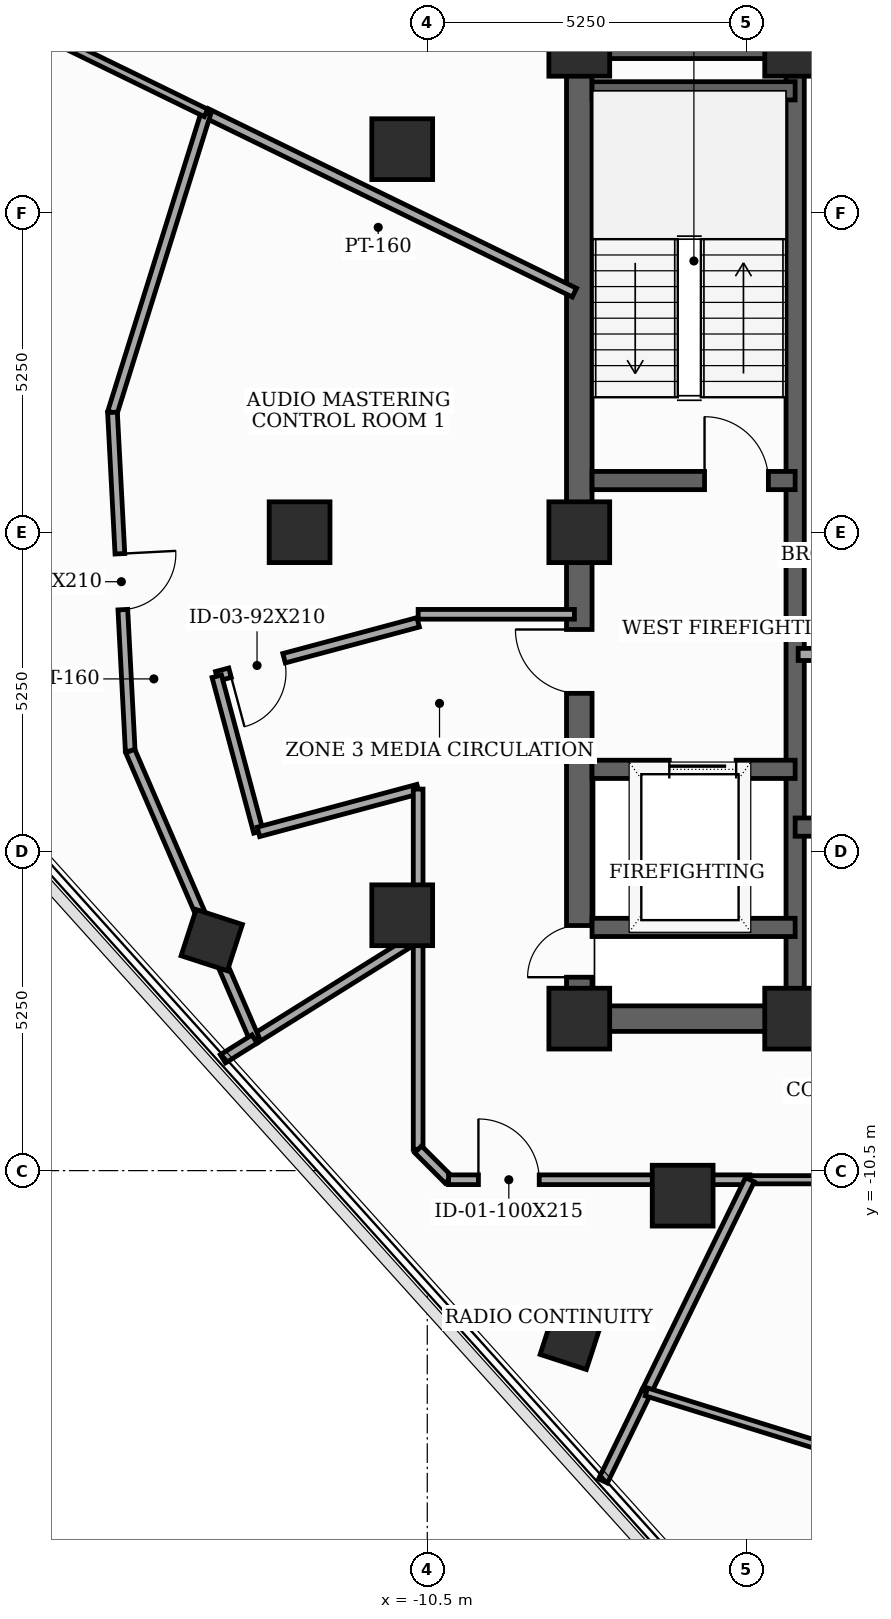
"""IFC4 building model, lengths in metres.
Left out: names, types, materials, properties, quantities, classifications, styles, units other than length and angle.
Written with IfcOpenShell. Run it as: python <this file> out.ifc"""

import sys

from ifc_helpers import new_model, si_unit, direction, frame, frame_2d, origin, origin_2d, place, context, subcontext, project, spatial, rectangle, extrude, element, fill, save


model = new_model("IFC4")
c1 = context("Model", 3, precision=1e-05, world=origin(), true_north=direction((0.0, 1.0)))
c2 = subcontext(c1, "Body", "Model", "MODEL_VIEW")
j1 = project(units=[si_unit("LENGTHUNIT", "METRE"), si_unit("PLANEANGLEUNIT", "RADIAN")], contexts=[c1])
p1 = place(None, origin())
s1 = spatial("IfcSite", under=j1, at=p1, CompositionType="ELEMENT")
p2 = place(p1, origin())
s2 = spatial("IfcBuilding", under=s1, at=p2, CompositionType="ELEMENT")
p3 = place(p2, frame((0.0, 0.0, 305.4)))
s3 = spatial("IfcBuildingStorey", under=s2, at=p3, CompositionType="ELEMENT", Elevation=305.4)
for number, where, z_axis, x_axis in (
    (1, (-8.0, -8.0, 0.0), (0.0, 0.0, 1.0), (1.0, 0.0, 0.0)),
    (2, (-4.45, -8.0, 0.0), (0.0, 0.0, 1.0), (1.0, 0.0, 0.0)),
    (3, (-4.45, 8.0, 0.0), (0.0, 0.0, 1.0), (1.0, 0.0, 0.0)),
    (4, (-8.0, 8.0, 0.0), (0.0, 0.0, 1.0), (1.0, 0.0, 0.0)),
    (5, (-8.0, 0.0, 0.0), (0.0, 0.0, 1.0), (1.0, 0.0, 0.0)),
    (6, (-10.912, 6.3, 0.0), (0.0, 0.0, 1.0), (1.0, 0.0, 0.0)),
    (7, (-12.6, 0.0, 0.0), (0.0, 0.0, 1.0), (1.0, 0.0, 0.0)),
    (8, (-10.912, -6.3, 0.0), (0.0, 0.0, 1.0), (1.0, 0.0, 0.0)),
    (9, (-6.3, -10.912, 0.0), (0.0, 0.0, 1.0), (1.0, 0.0, 0.0)),
):
    element("IfcColumn", number, at=place(p3, frame(where, z_axis=z_axis, x_axis=x_axis)), inside=s3, PredefinedType="COLUMN", context=c2, shape_type="SweptSolid", body=[
        extrude(rectangle(XDim=1.0, YDim=1.0, at=origin_2d()), origin(), (0.0, 0.0, 1.0), 3.7),
    ])
for number, where, z_axis, x_axis in (
    (10, (-14.045, -6.709, 0.0), (0.0, 0.0, 1.0), (0.309, 0.951, 0.0)),
    (11, (-8.14, -13.266, 0.0), (0.0, 0.0, 1.0), (0.309, 0.951, 0.0)),
):
    element("IfcColumn", number, at=place(p3, frame(where, z_axis=z_axis, x_axis=x_axis)), inside=s3, PredefinedType="COLUMN", context=c2, shape_type="SweptSolid", body=[
        extrude(rectangle(XDim=0.8, YDim=0.8, at=origin_2d()), origin(), (0.0, 0.0, 1.0), 3.7),
    ])
p4 = place(p3, frame((-8.0, -8.0, 0.0), z_axis=(0.0, 0.0, 1.0), x_axis=(0.0, 1.0, 0.0)))
e12 = element("IfcWall", 12, at=p4, inside=s3, PredefinedType="SHEAR", context=c2, shape_type="SweptSolid", body=[
    extrude(rectangle(XDim=16.0, YDim=0.42, at=frame_2d((8.0, 0.0))), origin(), (0.0, 0.0, 1.0), 3.5),
])
p5 = place(p4, frame((0.681, 0.0, 0.0)))
e13 = element("IfcOpeningElement", 13, at=p5, cuts=e12, PredefinedType="OPENING", context=c2, shape_type="SweptSolid", body=[
    extrude(rectangle(XDim=0.85, YDim=2.02, at=frame_2d((0.425, 1.01))), frame((0.0, 0.22, 0.0), z_axis=(0.0, -1.0, 0.0), x_axis=(1.0, 0.0, 0.0)), (0.0, 0.0, 1.0), 0.44),
])
p6 = place(p4, frame((5.35, 0.0, 0.0)))
e14 = element("IfcOpeningElement", 14, at=p6, cuts=e12, PredefinedType="OPENING", context=c2, shape_type="SweptSolid", body=[
    extrude(rectangle(XDim=1.05, YDim=2.15, at=frame_2d((0.525, 1.075))), frame((0.0, 0.22, 0.0), z_axis=(0.0, -1.0, 0.0), x_axis=(1.0, 0.0, 0.0)), (0.0, 0.0, 1.0), 0.44),
])
p7 = place(p3, frame((-8.0, -8.0, 0.0), z_axis=(0.0, 0.0, 1.0), x_axis=(1.0, 0.0, 0.0)))
e15 = element("IfcWall", 15, at=p7, inside=s3, PredefinedType="SHEAR", context=c2, shape_type="SweptSolid", body=[
    extrude(rectangle(XDim=16.0, YDim=0.42, at=frame_2d((8.0, 0.0))), origin(), (0.0, 0.0, 1.0), 3.5),
])
p8 = place(p7, frame((4.35, 0.0, 0.0)))
e16 = element("IfcOpeningElement", 16, at=p8, cuts=e15, PredefinedType="OPENING", context=c2, shape_type="SweptSolid", body=[
    extrude(rectangle(XDim=0.85, YDim=2.02, at=frame_2d((0.425, 1.01))), frame((0.0, 0.22, 0.0), z_axis=(0.0, -1.0, 0.0), x_axis=(1.0, 0.0, 0.0)), (0.0, 0.0, 1.0), 0.44),
])
p9 = place(p7, frame((6.49, 0.0, 0.0)))
e17 = element("IfcOpeningElement", 17, at=p9, cuts=e15, PredefinedType="OPENING", context=c2, shape_type="SweptSolid", body=[
    extrude(rectangle(XDim=0.85, YDim=2.02, at=frame_2d((0.425, 1.01))), frame((0.0, 0.22, 0.0), z_axis=(0.0, -1.0, 0.0), x_axis=(1.0, 0.0, 0.0)), (0.0, 0.0, 1.0), 0.44),
])
p10 = place(p7, frame((8.69, 0.0, 0.0)))
e18 = element("IfcOpeningElement", 18, at=p10, cuts=e15, PredefinedType="OPENING", context=c2, shape_type="SweptSolid", body=[
    extrude(rectangle(XDim=0.85, YDim=2.02, at=frame_2d((0.425, 1.01))), frame((0.0, 0.22, 0.0), z_axis=(0.0, -1.0, 0.0), x_axis=(1.0, 0.0, 0.0)), (0.0, 0.0, 1.0), 0.44),
])
p11 = place(p7, frame((10.8, 0.0, 0.0)))
e19 = element("IfcOpeningElement", 19, at=p11, cuts=e15, PredefinedType="OPENING", context=c2, shape_type="SweptSolid", body=[
    extrude(rectangle(XDim=0.85, YDim=2.02, at=frame_2d((0.425, 1.01))), frame((0.0, 0.22, 0.0), z_axis=(0.0, -1.0, 0.0), x_axis=(1.0, 0.0, 0.0)), (0.0, 0.0, 1.0), 0.44),
])
p12 = place(p3, frame((-8.0, 8.0, 0.0), z_axis=(0.0, 0.0, 1.0), x_axis=(1.0, 0.0, 0.0)))
e20 = element("IfcWall", 20, at=p12, inside=s3, PredefinedType="SHEAR", context=c2, shape_type="SweptSolid", body=[
    extrude(rectangle(XDim=16.0, YDim=0.42, at=frame_2d((8.0, 0.0))), origin(), (0.0, 0.0, 1.0), 3.5),
])
p13 = place(p12, frame((7.1, 0.0, 0.0)))
e21 = element("IfcOpeningElement", 21, at=p13, cuts=e20, PredefinedType="OPENING", context=c2, shape_type="SweptSolid", body=[
    extrude(rectangle(XDim=1.8, YDim=2.15, at=frame_2d((0.9, 1.075))), frame((0.0, 0.22, 0.0), z_axis=(0.0, -1.0, 0.0), x_axis=(1.0, 0.0, 0.0)), (0.0, 0.0, 1.0), 0.44),
])
p14 = place(p3, frame((-4.45, -7.79, 0.0), z_axis=(0.0, 0.0, 1.0), x_axis=(0.0, 1.0, 0.0)))
e22 = element("IfcWall", 22, at=p14, inside=s3, PredefinedType="SHEAR", context=c2, shape_type="SweptSolid", body=[
    extrude(rectangle(XDim=15.58, YDim=0.3, at=frame_2d((7.79, 0.0))), origin(), (0.0, 0.0, 1.0), 3.5),
])
p15 = place(p3, frame((-7.79, 0.85, 0.0), z_axis=(0.0, 0.0, 1.0), x_axis=(1.0, 0.0, 0.0)))
e23 = element("IfcWall", 23, at=p15, inside=s3, PredefinedType="SHEAR", context=c2, shape_type="SweptSolid", body=[
    extrude(rectangle(XDim=3.34, YDim=0.3, at=frame_2d((1.67, 0.0))), origin(), (0.0, 0.0, 1.0), 3.5),
])
p16 = place(p15, frame((1.85, 0.0, 0.0)))
e24 = element("IfcOpeningElement", 24, at=p16, cuts=e23, PredefinedType="OPENING", context=c2, shape_type="SweptSolid", body=[
    extrude(rectangle(XDim=1.05, YDim=2.15, at=frame_2d((0.525, 1.075))), frame((0.0, 0.16, 0.0), z_axis=(0.0, -1.0, 0.0), x_axis=(1.0, 0.0, 0.0)), (0.0, 0.0, 1.0), 0.32),
])
p17 = place(p3, frame((-7.79, 7.26, 0.0), z_axis=(0.0, 0.0, 1.0), x_axis=(1.0, 0.0, 0.0)))
e25 = element("IfcWall", 25, at=p17, inside=s3, PredefinedType="SHEAR", context=c2, shape_type="SweptSolid", body=[
    extrude(rectangle(XDim=3.34, YDim=0.3, at=frame_2d((1.67, 0.0))), origin(), (0.0, 0.0, 1.0), 3.5),
])
p18 = place(p3, frame((-7.79, -3.9, 0.0), z_axis=(0.0, 0.0, 1.0), x_axis=(1.0, 0.0, 0.0)))
e26 = element("IfcWall", 26, at=p18, inside=s3, PredefinedType="SHEAR", context=c2, shape_type="SweptSolid", body=[
    extrude(rectangle(XDim=3.34, YDim=0.3, at=frame_2d((1.67, 0.0))), origin(), (0.0, 0.0, 1.0), 3.5),
])
p19 = place(p18, frame((1.27, 0.0, 0.0)))
e27 = element("IfcOpeningElement", 27, at=p19, cuts=e26, PredefinedType="OPENING", context=c2, shape_type="SweptSolid", body=[
    extrude(rectangle(XDim=1.1, YDim=2.1, at=frame_2d((0.55, 1.05))), frame((0.0, 0.16, 0.0), z_axis=(0.0, -1.0, 0.0), x_axis=(1.0, 0.0, 0.0)), (0.0, 0.0, 1.0), 0.32),
])
p20 = place(p3, frame((-7.79, -6.5, 0.0), z_axis=(0.0, 0.0, 1.0), x_axis=(1.0, 0.0, 0.0)))
e28 = element("IfcWall", 28, at=p20, inside=s3, PredefinedType="SHEAR", context=c2, shape_type="SweptSolid", body=[
    extrude(rectangle(XDim=3.34, YDim=0.3, at=frame_2d((1.67, 0.0))), origin(), (0.0, 0.0, 1.0), 3.5),
])
p21 = place(p3, frame((-4.45, -4.85, 0.0), z_axis=(0.0, 0.0, 1.0), x_axis=(1.0, 0.0, 0.0)))
e29 = element("IfcWall", 29, at=p21, inside=s3, PredefinedType="SHEAR", context=c2, shape_type="SweptSolid", body=[
    extrude(rectangle(XDim=8.9, YDim=0.3, at=frame_2d((4.45, 0.0))), origin(), (0.0, 0.0, 1.0), 3.5),
])
p22 = place(p3, frame((-4.4, -2.01, 0.0), z_axis=(0.0, 0.0, 1.0), x_axis=(1.0, 0.0, 0.0)))
e30 = element("IfcWall", 30, at=p22, inside=s3, PredefinedType="SOLIDWALL", context=c2, shape_type="SweptSolid", body=[
    extrude(rectangle(XDim=2.68, YDim=0.2, at=frame_2d((1.34, 0.0))), origin(), (0.0, 0.0, 1.0), 3.5),
])
p23 = place(p3, frame((-8.08, -1.35, 0.0), z_axis=(0.0, 0.0, 1.0), x_axis=(-1.0, 0.0, 0.0)))
e31 = element("IfcWall", 31, at=p23, inside=s3, PredefinedType="PARTITIONING", context=c2, shape_type="SweptSolid", body=[
    extrude(rectangle(XDim=2.57, YDim=0.16, at=frame_2d((1.285, 0.0))), origin(), (0.0, 0.0, 1.0), 2.885),
])
p24 = place(p3, frame((-10.65, -1.482, 0.0), z_axis=(0.0, 0.0, 1.0), x_axis=(-0.965961397105, -0.2586862565, 0.0)))
e32 = element("IfcWall", 32, at=p24, inside=s3, PredefinedType="PARTITIONING", context=c2, shape_type="SweptSolid", body=[
    extrude(rectangle(XDim=3.429, YDim=0.16, at=frame_2d((1.714, 0.0))), origin(), (0.0, 0.0, 1.0), 2.885),
])
p25 = place(p24, frame((2.283, 0.0, 0.0)))
e33 = element("IfcOpeningElement", 33, at=p25, cuts=e32, PredefinedType="OPENING", context=c2, shape_type="SweptSolid", body=[
    extrude(rectangle(XDim=0.92, YDim=2.1, at=frame_2d((0.46, 1.05))), frame((0.0, 0.09, 0.0), z_axis=(0.0, -1.0, 0.0), x_axis=(1.0, 0.0, 0.0)), (0.0, 0.0, 1.0), 0.18),
])
p26 = place(p3, frame((-13.962, -2.369, 0.0), z_axis=(0.0, 0.0, 1.0), x_axis=(0.258413725385, -0.966034340245, 0.0)))
e34 = element("IfcWall", 34, at=p26, inside=s3, PredefinedType="PARTITIONING", context=c2, shape_type="SweptSolid", body=[
    extrude(rectangle(XDim=2.65, YDim=0.16, at=frame_2d((1.325, 0.0))), origin(), (0.0, 0.0, 1.0), 3.5),
])
p27 = place(p3, frame((-13.277, -4.929, 0.0), z_axis=(0.0, 0.0, 1.0), x_axis=(0.965934830229, 0.258785439601, 0.0)))
e35 = element("IfcWall", 35, at=p27, inside=s3, PredefinedType="PARTITIONING", context=c2, shape_type="SweptSolid", body=[
    extrude(rectangle(XDim=2.72, YDim=0.16, at=frame_2d((1.36, 0.0))), origin(), (0.0, 0.0, 1.0), 2.885),
])
p28 = place(p3, frame((-10.65, -4.225, 0.0), z_axis=(0.0, 0.0, 1.0), x_axis=(0.0, -1.0, 0.0)))
e36 = element("IfcWall", 36, at=p28, inside=s3, PredefinedType="PARTITIONING", context=c2, shape_type="SweptSolid", body=[
    extrude(rectangle(XDim=2.43, YDim=0.16, at=frame_2d((1.215, 0.0))), origin(), (0.0, 0.0, 1.0), 2.885),
])
p29 = place(p3, frame((-10.65, -6.655, 0.0), z_axis=(0.0, 0.0, 1.0), x_axis=(0.0, -1.0, 0.0)))
e37 = element("IfcWall", 37, at=p29, inside=s3, PredefinedType="PARTITIONING", context=c2, shape_type="SweptSolid", body=[
    extrude(rectangle(XDim=3.495, YDim=0.16, at=frame_2d((1.748, 0.0))), origin(), (0.0, 0.0, 1.0), 2.885),
])
p30 = place(p3, frame((-10.65, -10.15, 0.0), z_axis=(0.0, 0.0, 1.0), x_axis=(0.707106781187, -0.707106781187, 0.0)))
e38 = element("IfcWall", 38, at=p30, inside=s3, PredefinedType="PARTITIONING", context=c2, shape_type="SweptSolid", body=[
    extrude(rectangle(XDim=0.707, YDim=0.16, at=frame_2d((0.354, 0.0))), origin(), (0.0, 0.0, 1.0), 3.035),
])
p31 = place(p3, frame((-10.15, -10.65, 0.0), z_axis=(0.0, 0.0, 1.0), x_axis=(1.0, 0.0, 0.0)))
e39 = element("IfcWall", 39, at=p31, inside=s3, PredefinedType="PARTITIONING", context=c2, shape_type="SweptSolid", body=[
    extrude(rectangle(XDim=4.956, YDim=0.16, at=frame_2d((2.478, 0.0))), origin(), (0.0, 0.0, 1.0), 2.885),
])
p32 = place(p31, frame((0.491, 0.0, 0.0)))
e40 = element("IfcOpeningElement", 40, at=p32, cuts=e39, PredefinedType="OPENING", context=c2, shape_type="SweptSolid", body=[
    extrude(rectangle(XDim=1.0, YDim=2.15, at=frame_2d((0.5, 1.075))), frame((0.0, 0.09, 0.0), z_axis=(0.0, -1.0, 0.0), x_axis=(1.0, 0.0, 0.0)), (0.0, 0.0, 1.0), 0.18),
])
p33 = place(p3, frame((-5.194, -10.65, 0.0), z_axis=(0.0, 0.0, 1.0), x_axis=(1.0, 0.0, 0.0)))
e41 = element("IfcWall", 41, at=p33, inside=s3, PredefinedType="PARTITIONING", context=c2, shape_type="SweptSolid", body=[
    extrude(rectangle(XDim=7.458, YDim=0.135, at=frame_2d((3.729, 0.0))), origin(), (0.0, 0.0, 1.0), 2.885),
])
p34 = place(p33, frame((3.254, 0.0, 0.0)))
e42 = element("IfcOpeningElement", 42, at=p34, cuts=e41, PredefinedType="OPENING", context=c2, shape_type="SweptSolid", body=[
    extrude(rectangle(XDim=0.95, YDim=2.1, at=frame_2d((0.475, 1.05))), frame((0.0, 0.077, 0.0), z_axis=(0.0, -1.0, 0.0), x_axis=(1.0, 0.0, 0.0)), (0.0, 0.0, 1.0), 0.155),
])
p35 = place(p3, frame((-13.341, -8.336, 0.0), z_axis=(0.0, 0.0, 1.0), x_axis=(0.848149563096, 0.529756848582, 0.0)))
e43 = element("IfcWall", 43, at=p35, inside=s3, PredefinedType="PARTITIONING", context=c2, shape_type="SweptSolid", body=[
    extrude(rectangle(XDim=3.173, YDim=0.16, at=frame_2d((1.586, 0.0))), origin(), (0.0, 0.0, 1.0), 2.885),
])
p36 = place(p3, frame((-8.08, 3.941, 0.0), z_axis=(0.0, 0.0, 1.0), x_axis=(-0.898780627628, 0.438398658074, 0.0)))
e44 = element("IfcWall", 44, at=p36, inside=s3, PredefinedType="PARTITIONING", context=c2, shape_type="SweptSolid", body=[
    extrude(rectangle(XDim=6.741, YDim=0.16, at=frame_2d((3.371, 0.0))), origin(), (0.0, 0.0, 1.0), 2.885),
])
p37 = place(p3, frame((-14.139, 6.896, 0.0), z_axis=(0.0, 0.0, 1.0), x_axis=(-0.298099863076, -0.954534688544, 0.0)))
e45 = element("IfcWall", 45, at=p37, inside=s3, PredefinedType="PARTITIONING", context=c2, shape_type="SweptSolid", body=[
    extrude(rectangle(XDim=5.16, YDim=0.16, at=frame_2d((2.58, 0.0))), origin(), (0.0, 0.0, 1.0), 3.5),
])
p38 = place(p3, frame((-15.677, 1.971, 0.0), z_axis=(0.0, 0.0, 1.0), x_axis=(0.052349772407, -0.998628810584, 0.0)))
e46 = element("IfcWall", 46, at=p38, inside=s3, PredefinedType="PARTITIONING", context=c2, shape_type="SweptSolid", body=[
    extrude(rectangle(XDim=5.578, YDim=0.16, at=frame_2d((2.789, 0.0))), origin(), (0.0, 0.0, 1.0), 3.035),
])
p39 = place(p38, frame((2.329, 0.0, 0.0)))
e47 = element("IfcOpeningElement", 47, at=p39, cuts=e46, PredefinedType="OPENING", context=c2, shape_type="SweptSolid", body=[
    extrude(rectangle(XDim=0.92, YDim=2.1, at=frame_2d((0.46, 1.05))), frame((0.0, 0.09, 0.0), z_axis=(0.0, -1.0, 0.0), x_axis=(1.0, 0.0, 0.0)), (0.0, 0.0, 1.0), 0.18),
])
p40 = place(p3, frame((-15.385, -3.599, 0.0), z_axis=(0.0, 0.0, 1.0), x_axis=(0.396191247476, -0.918168010455, 0.0)))
e48 = element("IfcWall", 48, at=p40, inside=s3, PredefinedType="PARTITIONING", context=c2, shape_type="SweptSolid", body=[
    extrude(rectangle(XDim=5.159, YDim=0.16, at=frame_2d((2.58, 0.0))), origin(), (0.0, 0.0, 1.0), 3.035),
])
p41 = place(p3, frame((-6.896, -14.139, 0.0), z_axis=(0.0, 0.0, 1.0), x_axis=(0.438412480261, 0.898773885441, 0.0)))
e49 = element("IfcWall", 49, at=p41, inside=s3, PredefinedType="PARTITIONING", context=c2, shape_type="SweptSolid", body=[
    extrude(rectangle(XDim=3.882, YDim=0.16, at=frame_2d((1.941, 0.0))), origin(), (0.0, 0.0, 1.0), 2.885),
])
p42 = place(p3, frame((-7.61, -15.604, 0.0), z_axis=(0.0, 0.0, 1.0), x_axis=(0.438143244506, 0.898905165907, 0.0)))
e50 = element("IfcWall", 50, at=p42, inside=s3, PredefinedType="PARTITIONING", context=c2, shape_type="SweptSolid", body=[
    extrude(rectangle(XDim=1.63, YDim=0.16, at=frame_2d((0.815, 0.0))), origin(), (0.0, 0.0, 1.0), 3.035),
])
p43 = place(p3, frame((-13.341, -8.336, 0.0), z_axis=(0.0, 0.0, 1.0), x_axis=(-0.847685142663, -0.530499669094, 0.0)))
e51 = element("IfcWall", 51, at=p43, inside=s3, PredefinedType="PARTITIONING", context=c2, shape_type="SweptSolid", body=[
    extrude(rectangle(XDim=0.614, YDim=0.16, at=frame_2d((0.307, 0.0))), origin(), (0.0, 0.0, 1.0), 3.5),
])
p44 = place(p3, frame((-6.896, -14.139, 0.0), z_axis=(0.0, 0.0, 1.0), x_axis=(0.955033449162, -0.296498079221, 0.0)))
e52 = element("IfcWall", 52, at=p44, inside=s3, PredefinedType="PARTITIONING", context=c2, shape_type="SweptSolid", body=[
    extrude(rectangle(XDim=5.204, YDim=0.135, at=frame_2d((2.602, 0.0))), origin(), (0.0, 0.0, 1.0), 3.5),
])
p45 = place(p3, frame((-23.498, 11.461, 0.0), z_axis=(0.0, 0.0, 1.0), x_axis=(0.898777683883, -0.438404693125, 0.0)))
e53 = element("IfcWall", 53, at=p45, inside=s3, PredefinedType="PARTITIONING", context=c2, shape_type="SweptSolid", body=[
    extrude(rectangle(XDim=10.413, YDim=0.135, at=frame_2d((5.207, 0.0))), origin(), (0.0, 0.0, 1.0), 3.035),
])
p46 = place(p5, origin())
e54 = element("IfcDoor", 54, at=p46, inside=s3, OperationType="SINGLE_SWING_LEFT", PredefinedType="TRAPDOOR", context=c2, shape_type="SweptSolid", body=[
    extrude(rectangle(XDim=0.85, YDim=2.02, at=frame_2d((0.425, 1.01))), frame((0.0, 0.025, 0.0), z_axis=(0.0, -1.0, 0.0), x_axis=(1.0, 0.0, 0.0)), (0.0, 0.0, 1.0), 0.05),
])
fill(e13, e54)
p47 = place(p6, origin())
e55 = element("IfcDoor", 55, at=p47, inside=s3, OperationType="SINGLE_SWING_RIGHT", PredefinedType="DOOR", context=c2, shape_type="SweptSolid", body=[
    extrude(rectangle(XDim=1.05, YDim=2.15, at=frame_2d((0.525, 1.075))), frame((0.0, 0.025, 0.0), z_axis=(0.0, -1.0, 0.0), x_axis=(1.0, 0.0, 0.0)), (0.0, 0.0, 1.0), 0.05),
])
fill(e14, e55)
p48 = place(p16, origin())
e56 = element("IfcDoor", 56, at=p48, inside=s3, OperationType="SINGLE_SWING_LEFT", PredefinedType="DOOR", context=c2, shape_type="SweptSolid", body=[
    extrude(rectangle(XDim=1.05, YDim=2.15, at=frame_2d((0.525, 1.075))), frame((0.0, 0.025, 0.0), z_axis=(0.0, -1.0, 0.0), x_axis=(1.0, 0.0, 0.0)), (0.0, 0.0, 1.0), 0.05),
])
fill(e24, e56)
p49 = place(p19, origin())
e57 = element("IfcDoor", 57, at=p49, inside=s3, OperationType="SLIDING_TO_LEFT", PredefinedType="DOOR", context=c2, shape_type="SweptSolid", body=[
    extrude(rectangle(XDim=1.1, YDim=2.1, at=frame_2d((0.55, 1.05))), frame((0.0, 0.025, 0.0), z_axis=(0.0, -1.0, 0.0), x_axis=(1.0, 0.0, 0.0)), (0.0, 0.0, 1.0), 0.05),
])
fill(e27, e57)
p50 = place(p25, origin())
e58 = element("IfcDoor", 58, at=p50, inside=s3, OperationType="SINGLE_SWING_RIGHT", PredefinedType="DOOR", context=c2, shape_type="SweptSolid", body=[
    extrude(rectangle(XDim=0.92, YDim=2.1, at=frame_2d((0.46, 1.05))), frame((0.0, 0.025, 0.0), z_axis=(0.0, -1.0, 0.0), x_axis=(1.0, 0.0, 0.0)), (0.0, 0.0, 1.0), 0.05),
])
fill(e33, e58)
p51 = place(p32, origin())
e59 = element("IfcDoor", 59, at=p51, inside=s3, OperationType="SINGLE_SWING_LEFT", PredefinedType="DOOR", context=c2, shape_type="SweptSolid", body=[
    extrude(rectangle(XDim=1.0, YDim=2.15, at=frame_2d((0.5, 1.075))), frame((0.0, 0.025, 0.0), z_axis=(0.0, -1.0, 0.0), x_axis=(1.0, 0.0, 0.0)), (0.0, 0.0, 1.0), 0.05),
])
fill(e40, e59)
p52 = place(p39, origin())
e60 = element("IfcDoor", 60, at=p52, inside=s3, OperationType="SINGLE_SWING_LEFT", PredefinedType="DOOR", context=c2, shape_type="SweptSolid", body=[
    extrude(rectangle(XDim=0.92, YDim=2.1, at=frame_2d((0.46, 1.05))), frame((0.0, 0.025, 0.0), z_axis=(0.0, -1.0, 0.0), x_axis=(1.0, 0.0, 0.0)), (0.0, 0.0, 1.0), 0.05),
])
fill(e47, e60)
save(model, sys.argv[1])
